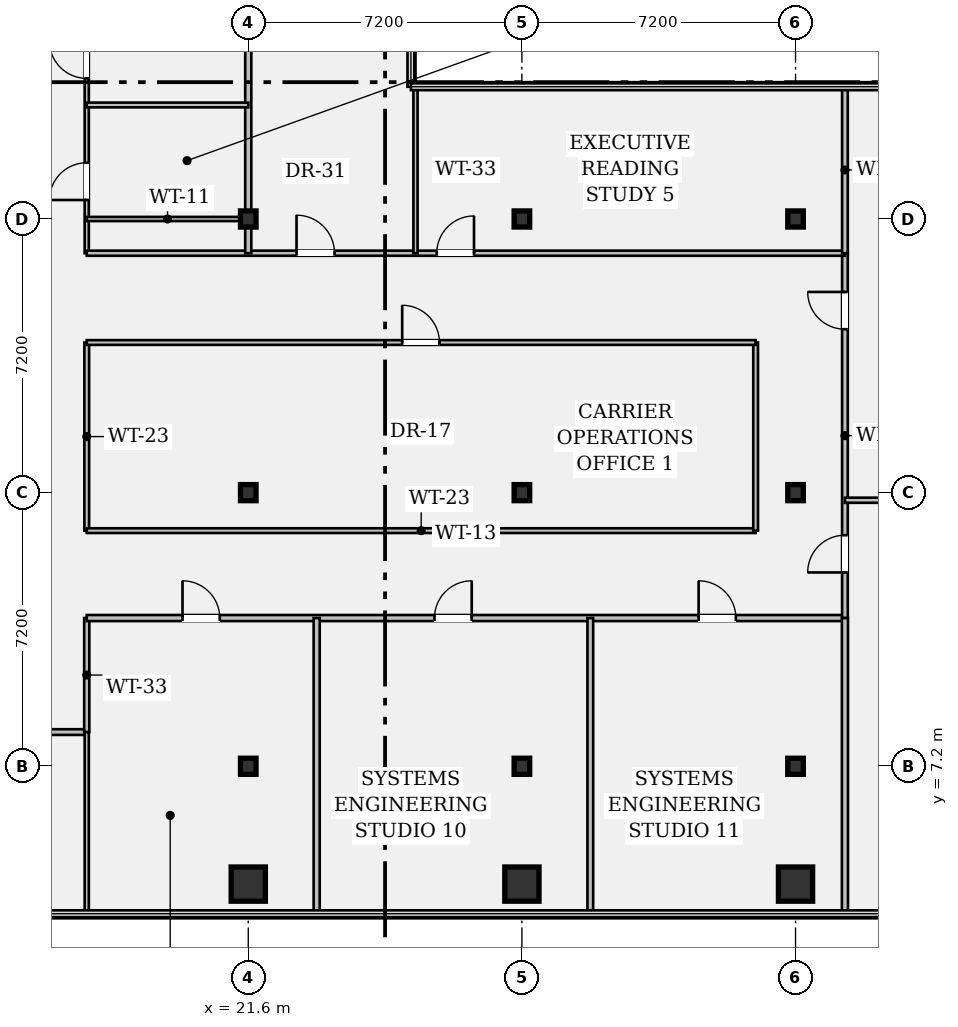
"""IFC4 building model, lengths in metres.
Left out: names, types, materials, properties, quantities, classifications, styles, units other than length and angle.
Written with IfcOpenShell. Run it as: python <this file> out.ifc"""

import sys

from ifc_helpers import new_model, si_unit, direction, frame, frame_2d, origin, origin_2d, place, context, subcontext, project, spatial, rectangle, hollow_rectangle, i_section, extrude, element, fill, save


model = new_model("IFC4")
c1 = context("Model", 3, precision=1e-05, world=origin(), true_north=direction((0.0, 1.0)))
c2 = subcontext(c1, "Body", "Model", "MODEL_VIEW")
j1 = project(units=[si_unit("LENGTHUNIT", "METRE"), si_unit("PLANEANGLEUNIT", "RADIAN")], contexts=[c1])
p1 = place(None, origin())
s1 = spatial("IfcSite", under=j1, at=p1, CompositionType="ELEMENT")
p2 = place(p1, origin())
s2 = spatial("IfcBuilding", under=s1, at=p2, CompositionType="ELEMENT")
p3 = place(p2, frame((0.0, 0.0, 129.15)))
s3 = spatial("IfcBuildingStorey", under=s2, at=p3, CompositionType="ELEMENT", Elevation=129.15)
p4 = place(p3, frame((21.6, 4.1, 0.0), z_axis=(0.0, 0.0, 1.0), x_axis=(1.0, 0.0, 0.0)))
e1 = element("IfcColumn", 1, at=p4, inside=s3, PredefinedType="COLUMN", context=c2, shape_type="SweptSolid", body=[
    extrude(hollow_rectangle(XDim=0.9, YDim=0.9, WallThickness=0.055, at=origin_2d()), origin(), (0.0, 0.0, 1.0), 3.58),
])
for number, where, z_axis, x_axis in (
    (2, (21.6, 7.2, 0.0), (0.0, 0.0, 1.0), (1.0, 0.0, 0.0)),
    (3, (21.6, 14.4, 0.0), (0.0, 0.0, 1.0), (1.0, 0.0, 0.0)),
    (4, (21.6, 21.6, 0.0), (0.0, 0.0, 1.0), (1.0, 0.0, 0.0)),
):
    element("IfcColumn", number, at=place(p3, frame(where, z_axis=z_axis, x_axis=x_axis)), inside=s3, PredefinedType="COLUMN", context=c2, shape_type="SweptSolid", body=[
        extrude(i_section(OverallWidth=0.409, OverallDepth=0.424, WebThickness=0.033, FlangeThickness=0.052, FilletRadius=0.018, at=origin_2d()), origin(), (0.0, 0.0, 1.0), 3.58),
    ])
p5 = place(p3, frame((28.8, 4.1, 0.0), z_axis=(0.0, 0.0, 1.0), x_axis=(1.0, 0.0, 0.0)))
e5 = element("IfcColumn", 5, at=p5, inside=s3, PredefinedType="COLUMN", context=c2, shape_type="SweptSolid", body=[
    extrude(hollow_rectangle(XDim=0.9, YDim=0.9, WallThickness=0.055, at=origin_2d()), origin(), (0.0, 0.0, 1.0), 3.58),
])
for number, where, z_axis, x_axis in (
    (6, (28.8, 7.2, 0.0), (0.0, 0.0, 1.0), (1.0, 0.0, 0.0)),
    (7, (28.8, 14.4, 0.0), (0.0, 0.0, 1.0), (1.0, 0.0, 0.0)),
    (8, (28.8, 21.6, 0.0), (0.0, 0.0, 1.0), (1.0, 0.0, 0.0)),
):
    element("IfcColumn", number, at=place(p3, frame(where, z_axis=z_axis, x_axis=x_axis)), inside=s3, PredefinedType="COLUMN", context=c2, shape_type="SweptSolid", body=[
        extrude(i_section(OverallWidth=0.409, OverallDepth=0.424, WebThickness=0.033, FlangeThickness=0.052, FilletRadius=0.018, at=origin_2d()), origin(), (0.0, 0.0, 1.0), 3.58),
    ])
p6 = place(p3, frame((36.0, 4.1, 0.0), z_axis=(0.0, 0.0, 1.0), x_axis=(1.0, 0.0, 0.0)))
e9 = element("IfcColumn", 9, at=p6, inside=s3, PredefinedType="COLUMN", context=c2, shape_type="SweptSolid", body=[
    extrude(hollow_rectangle(XDim=0.9, YDim=0.9, WallThickness=0.055, at=origin_2d()), origin(), (0.0, 0.0, 1.0), 3.58),
])
for number, where, z_axis, x_axis in (
    (10, (36.0, 7.2, 0.0), (0.0, 0.0, 1.0), (1.0, 0.0, 0.0)),
    (11, (36.0, 14.4, 0.0), (0.0, 0.0, 1.0), (1.0, 0.0, 0.0)),
    (12, (36.0, 21.6, 0.0), (0.0, 0.0, 1.0), (1.0, 0.0, 0.0)),
):
    element("IfcColumn", number, at=place(p3, frame(where, z_axis=z_axis, x_axis=x_axis)), inside=s3, PredefinedType="COLUMN", context=c2, shape_type="SweptSolid", body=[
        extrude(i_section(OverallWidth=0.409, OverallDepth=0.424, WebThickness=0.033, FlangeThickness=0.052, FilletRadius=0.018, at=origin_2d()), origin(), (0.0, 0.0, 1.0), 3.58),
    ])
p7 = place(p3, frame((14.4, 8.1, 0.0), z_axis=(0.0, 0.0, 1.0), x_axis=(1.0, 0.0, 0.0)))
e13 = element("IfcWall", 13, at=p7, inside=s3, PredefinedType="PARTITIONING", context=c2, shape_type="SweptSolid", body=[
    extrude(rectangle(XDim=2.95, YDim=0.15, at=frame_2d((1.475, 0.0))), origin(), (0.0, 0.0, 1.0), 3.148),
])
p8 = place(p7, frame((0.95, 0.0, 0.0)))
e14 = element("IfcOpeningElement", 14, at=p8, cuts=e13, PredefinedType="OPENING", context=c2, shape_type="SweptSolid", body=[
    extrude(rectangle(XDim=0.98, YDim=2.15, at=frame_2d((0.49, 1.075))), frame((0.0, 0.087, 0.0), z_axis=(0.0, -1.0, 0.0), x_axis=(1.0, 0.0, 0.0)), (0.0, 0.0, 1.0), 0.174),
])
p9 = place(p3, frame((17.35, 8.1, 0.0), z_axis=(0.0, 0.0, 1.0), x_axis=(0.0, 1.0, 0.0)))
e15 = element("IfcWall", 15, at=p9, inside=s3, PredefinedType="PARTITIONING", context=c2, shape_type="SweptSolid", body=[
    extrude(rectangle(XDim=3.0, YDim=0.135, at=frame_2d((1.5, 0.0))), origin(), (0.0, 0.0, 1.0), 3.58),
])
p10 = place(p3, frame((17.35, 20.7, 0.0), z_axis=(0.0, 0.0, 1.0), x_axis=(0.0, 1.0, 0.0)))
e16 = element("IfcWall", 16, at=p10, inside=s3, PredefinedType="PARTITIONING", context=c2, shape_type="SweptSolid", body=[
    extrude(rectangle(XDim=15.2, YDim=0.11, at=frame_2d((7.6, 0.0))), origin(), (0.0, 0.0, 1.0), 2.869),
])
p11 = place(p10, frame((1.4, 0.0, 0.0)))
e17 = element("IfcOpeningElement", 17, at=p11, cuts=e16, PredefinedType="OPENING", context=c2, shape_type="SweptSolid", body=[
    extrude(rectangle(XDim=0.98, YDim=2.15, at=frame_2d((0.49, 1.075))), frame((0.0, 0.067, 0.0), z_axis=(0.0, -1.0, 0.0), x_axis=(1.0, 0.0, 0.0)), (0.0, 0.0, 1.0), 0.134),
])
p12 = place(p10, frame((4.6, 0.0, 0.0)))
e18 = element("IfcOpeningElement", 18, at=p12, cuts=e16, PredefinedType="OPENING", context=c2, shape_type="SweptSolid", body=[
    extrude(rectangle(XDim=0.98, YDim=2.15, at=frame_2d((0.49, 1.075))), frame((0.0, 0.067, 0.0), z_axis=(0.0, -1.0, 0.0), x_axis=(1.0, 0.0, 0.0)), (0.0, 0.0, 1.0), 0.134),
])
p13 = place(p10, frame((8.0, 0.0, 0.0)))
e19 = element("IfcOpeningElement", 19, at=p13, cuts=e16, PredefinedType="OPENING", context=c2, shape_type="SweptSolid", body=[
    extrude(rectangle(XDim=0.98, YDim=2.15, at=frame_2d((0.49, 1.075))), frame((0.0, 0.067, 0.0), z_axis=(0.0, -1.0, 0.0), x_axis=(1.0, 0.0, 0.0)), (0.0, 0.0, 1.0), 0.134),
])
p14 = place(p10, frame((11.5, 0.0, 0.0)))
e20 = element("IfcOpeningElement", 20, at=p14, cuts=e16, PredefinedType="OPENING", context=c2, shape_type="SweptSolid", body=[
    extrude(rectangle(XDim=0.98, YDim=2.15, at=frame_2d((0.49, 1.075))), frame((0.0, 0.067, 0.0), z_axis=(0.0, -1.0, 0.0), x_axis=(1.0, 0.0, 0.0)), (0.0, 0.0, 1.0), 0.134),
])
p15 = place(p3, frame((17.35, 11.1, 0.0), z_axis=(0.0, 0.0, 1.0), x_axis=(1.0, 0.0, 0.0)))
e21 = element("IfcWall", 21, at=p15, inside=s3, PredefinedType="PARTITIONING", context=c2, shape_type="SweptSolid", body=[
    extrude(rectangle(XDim=19.95, YDim=0.16, at=frame_2d((9.975, 0.0))), origin(), (0.0, 0.0, 1.0), 2.869),
])
p16 = place(p15, frame((2.52, 0.0, 0.0)))
e22 = element("IfcOpeningElement", 22, at=p16, cuts=e21, PredefinedType="OPENING", context=c2, shape_type="SweptSolid", body=[
    extrude(rectangle(XDim=0.98, YDim=2.15, at=frame_2d((0.49, 1.075))), frame((0.0, 0.092, 0.0), z_axis=(0.0, -1.0, 0.0), x_axis=(1.0, 0.0, 0.0)), (0.0, 0.0, 1.0), 0.184),
])
p17 = place(p15, frame((9.15, 0.0, 0.0)))
e23 = element("IfcOpeningElement", 23, at=p17, cuts=e21, PredefinedType="OPENING", context=c2, shape_type="SweptSolid", body=[
    extrude(rectangle(XDim=0.98, YDim=2.15, at=frame_2d((0.49, 1.075))), frame((0.0, 0.092, 0.0), z_axis=(0.0, -1.0, 0.0), x_axis=(1.0, 0.0, 0.0)), (0.0, 0.0, 1.0), 0.184),
])
p18 = place(p15, frame((16.1, 0.0, 0.0)))
e24 = element("IfcOpeningElement", 24, at=p18, cuts=e21, PredefinedType="OPENING", context=c2, shape_type="SweptSolid", body=[
    extrude(rectangle(XDim=0.98, YDim=2.15, at=frame_2d((0.49, 1.075))), frame((0.0, 0.092, 0.0), z_axis=(0.0, -1.0, 0.0), x_axis=(1.0, 0.0, 0.0)), (0.0, 0.0, 1.0), 0.184),
])
p19 = place(p3, frame((37.3, 11.1, 0.0), z_axis=(0.0, 0.0, 1.0), x_axis=(0.0, 1.0, 0.0)))
e25 = element("IfcWall", 25, at=p19, inside=s3, PredefinedType="PARTITIONING", context=c2, shape_type="SweptSolid", body=[
    extrude(rectangle(XDim=9.6, YDim=0.15, at=frame_2d((4.8, 0.0))), origin(), (0.0, 0.0, 1.0), 2.869),
])
p20 = place(p19, frame((1.2, 0.0, 0.0)))
e26 = element("IfcOpeningElement", 26, at=p20, cuts=e25, PredefinedType="OPENING", context=c2, shape_type="SweptSolid", body=[
    extrude(rectangle(XDim=0.98, YDim=2.15, at=frame_2d((0.49, 1.075))), frame((0.0, 0.087, 0.0), z_axis=(0.0, -1.0, 0.0), x_axis=(1.0, 0.0, 0.0)), (0.0, 0.0, 1.0), 0.174),
])
p21 = place(p19, frame((7.6, 0.0, 0.0)))
e27 = element("IfcOpeningElement", 27, at=p21, cuts=e25, PredefinedType="OPENING", context=c2, shape_type="SweptSolid", body=[
    extrude(rectangle(XDim=0.98, YDim=2.15, at=frame_2d((0.49, 1.075))), frame((0.0, 0.087, 0.0), z_axis=(0.0, -1.0, 0.0), x_axis=(1.0, 0.0, 0.0)), (0.0, 0.0, 1.0), 0.174),
])
p22 = place(p3, frame((17.35, 20.7, 0.0), z_axis=(0.0, 0.0, 1.0), x_axis=(1.0, 0.0, 0.0)))
e28 = element("IfcWall", 28, at=p22, inside=s3, PredefinedType="PARTITIONING", context=c2, shape_type="SweptSolid", body=[
    extrude(rectangle(XDim=19.95, YDim=0.135, at=frame_2d((9.975, 0.0))), origin(), (0.0, 0.0, 1.0), 2.869),
])
p23 = place(p22, frame((5.52, 0.0, 0.0)))
e29 = element("IfcOpeningElement", 29, at=p23, cuts=e28, PredefinedType="OPENING", context=c2, shape_type="SweptSolid", body=[
    extrude(rectangle(XDim=1.0, YDim=2.15, at=frame_2d((0.5, 1.075))), frame((0.0, 0.08, 0.0), z_axis=(0.0, -1.0, 0.0), x_axis=(1.0, 0.0, 0.0)), (0.0, 0.0, 1.0), 0.159),
])
p24 = place(p22, frame((9.21, 0.0, 0.0)))
e30 = element("IfcOpeningElement", 30, at=p24, cuts=e28, PredefinedType="OPENING", context=c2, shape_type="SweptSolid", body=[
    extrude(rectangle(XDim=0.98, YDim=2.15, at=frame_2d((0.49, 1.075))), frame((0.0, 0.08, 0.0), z_axis=(0.0, -1.0, 0.0), x_axis=(1.0, 0.0, 0.0)), (0.0, 0.0, 1.0), 0.159),
])
p25 = place(p3, frame((17.35, 13.4, 0.0), z_axis=(0.0, 0.0, 1.0), x_axis=(0.0, 1.0, 0.0)))
e31 = element("IfcWall", 31, at=p25, inside=s3, PredefinedType="PARTITIONING", context=c2, shape_type="SweptSolid", body=[
    extrude(rectangle(XDim=4.95, YDim=0.125, at=frame_2d((2.475, 0.0))), origin(), (0.0, 0.0, 1.0), 2.869),
])
p26 = place(p3, frame((17.35, 13.4, 0.0), z_axis=(0.0, 0.0, 1.0), x_axis=(1.0, 0.0, 0.0)))
e32 = element("IfcWall", 32, at=p26, inside=s3, PredefinedType="PARTITIONING", context=c2, shape_type="SweptSolid", body=[
    extrude(rectangle(XDim=17.6, YDim=0.125, at=frame_2d((8.8, 0.0))), origin(), (0.0, 0.0, 1.0), 2.869),
])
p27 = place(p3, frame((34.95, 13.4, 0.0), z_axis=(0.0, 0.0, 1.0), x_axis=(0.0, 1.0, 0.0)))
e33 = element("IfcWall", 33, at=p27, inside=s3, PredefinedType="PARTITIONING", context=c2, shape_type="SweptSolid", body=[
    extrude(rectangle(XDim=4.95, YDim=0.125, at=frame_2d((2.475, 0.0))), origin(), (0.0, 0.0, 1.0), 2.869),
])
p28 = place(p3, frame((17.35, 18.35, 0.0), z_axis=(0.0, 0.0, 1.0), x_axis=(1.0, 0.0, 0.0)))
e34 = element("IfcWall", 34, at=p28, inside=s3, PredefinedType="PARTITIONING", context=c2, shape_type="SweptSolid", body=[
    extrude(rectangle(XDim=17.6, YDim=0.125, at=frame_2d((8.8, 0.0))), origin(), (0.0, 0.0, 1.0), 2.869),
])
p29 = place(p28, frame((8.3, 0.0, 0.0)))
e35 = element("IfcOpeningElement", 35, at=p29, cuts=e34, PredefinedType="OPENING", context=c2, shape_type="SweptSolid", body=[
    extrude(rectangle(XDim=0.98, YDim=2.15, at=frame_2d((0.49, 1.075))), frame((0.0, 0.074, 0.0), z_axis=(0.0, -1.0, 0.0), x_axis=(1.0, 0.0, 0.0)), (0.0, 0.0, 1.0), 0.149),
])
p30 = place(p3, frame((17.35, 21.6, 0.0), z_axis=(0.0, 0.0, 1.0), x_axis=(1.0, 0.0, 0.0)))
e36 = element("IfcWall", 36, at=p30, inside=s3, PredefinedType="PARTITIONING", context=c2, shape_type="SweptSolid", body=[
    extrude(rectangle(XDim=4.25, YDim=0.11, at=frame_2d((2.125, 0.0))), origin(), (0.0, 0.0, 1.0), 2.869),
])
p31 = place(p3, frame((21.6, 20.7, 0.0), z_axis=(0.0, 0.0, 1.0), x_axis=(0.0, 1.0, 0.0)))
e37 = element("IfcWall", 37, at=p31, inside=s3, PredefinedType="PARTITIONING", context=c2, shape_type="SweptSolid", body=[
    extrude(rectangle(XDim=22.38, YDim=0.16, at=frame_2d((11.19, 0.0))), origin(), (0.0, 0.0, 1.0), 2.869),
])
p32 = place(p3, frame((17.35, 24.6, 0.0), z_axis=(0.0, 0.0, 1.0), x_axis=(1.0, 0.0, 0.0)))
e38 = element("IfcWall", 38, at=p32, inside=s3, PredefinedType="PARTITIONING", context=c2, shape_type="SweptSolid", body=[
    extrude(rectangle(XDim=4.25, YDim=0.125, at=frame_2d((2.125, 0.0))), origin(), (0.0, 0.0, 1.0), 2.869),
])
p33 = place(p3, frame((26.0, 20.7, 0.0), z_axis=(0.0, 0.0, 1.0), x_axis=(0.0, 1.0, 0.0)))
e39 = element("IfcWall", 39, at=p33, inside=s3, PredefinedType="PARTITIONING", context=c2, shape_type="SweptSolid", body=[
    extrude(rectangle(XDim=4.38, YDim=0.11, at=frame_2d((2.19, 0.0))), origin(), (0.0, 0.0, 1.0), 2.869),
])
p34 = place(p3, frame((37.3, 3.32, 0.0), z_axis=(0.0, 0.0, 1.0), x_axis=(0.0, 1.0, 0.0)))
e40 = element("IfcWall", 40, at=p34, inside=s3, PredefinedType="PARTITIONING", context=c2, shape_type="SweptSolid", body=[
    extrude(rectangle(XDim=7.78, YDim=0.16, at=frame_2d((3.89, 0.0))), origin(), (0.0, 0.0, 1.0), 2.869),
])
p35 = place(p3, frame((37.3, 20.7, 0.0), z_axis=(0.0, 0.0, 1.0), x_axis=(0.0, 1.0, 0.0)))
e41 = element("IfcWall", 41, at=p35, inside=s3, PredefinedType="PARTITIONING", context=c2, shape_type="SweptSolid", body=[
    extrude(rectangle(XDim=4.38, YDim=0.15, at=frame_2d((2.19, 0.0))), origin(), (0.0, 0.0, 1.0), 2.869),
])
p36 = place(p3, frame((37.3, 14.2, 0.0), z_axis=(0.0, 0.0, 1.0), x_axis=(1.0, 0.0, 0.0)))
e42 = element("IfcWall", 42, at=p36, inside=s3, PredefinedType="PARTITIONING", context=c2, shape_type="SweptSolid", body=[
    extrude(rectangle(XDim=9.78, YDim=0.135, at=frame_2d((4.89, 0.0))), origin(), (0.0, 0.0, 1.0), 2.869),
])
p37 = place(p3, frame((17.35, 3.32, 0.0), z_axis=(0.0, 0.0, 1.0), x_axis=(0.0, 1.0, 0.0)))
e43 = element("IfcWall", 43, at=p37, inside=s3, PredefinedType="PARTITIONING", context=c2, shape_type="SweptSolid", body=[
    extrude(rectangle(XDim=4.78, YDim=0.11, at=frame_2d((2.39, 0.0))), origin(), (0.0, 0.0, 1.0), 2.869),
])
p38 = place(p3, frame((23.4, 3.32, 0.0), z_axis=(0.0, 0.0, 1.0), x_axis=(0.0, 1.0, 0.0)))
e44 = element("IfcWall", 44, at=p38, inside=s3, PredefinedType="PARTITIONING", context=c2, shape_type="SweptSolid", body=[
    extrude(rectangle(XDim=7.78, YDim=0.16, at=frame_2d((3.89, 0.0))), origin(), (0.0, 0.0, 1.0), 2.869),
])
p39 = place(p3, frame((30.6, 3.32, 0.0), z_axis=(0.0, 0.0, 1.0), x_axis=(0.0, 1.0, 0.0)))
e45 = element("IfcWall", 45, at=p39, inside=s3, PredefinedType="PARTITIONING", context=c2, shape_type="SweptSolid", body=[
    extrude(rectangle(XDim=7.78, YDim=0.15, at=frame_2d((3.89, 0.0))), origin(), (0.0, 0.0, 1.0), 2.869),
])
p40 = place(p29, origin())
e46 = element("IfcDoor", 46, at=p40, inside=s3, OperationType="SINGLE_SWING_LEFT", PredefinedType="DOOR", context=c2, shape_type="SweptSolid", body=[
    extrude(rectangle(XDim=0.98, YDim=2.15, at=frame_2d((0.49, 1.075))), frame((0.0, 0.025, 0.0), z_axis=(0.0, -1.0, 0.0), x_axis=(1.0, 0.0, 0.0)), (0.0, 0.0, 1.0), 0.05),
])
fill(e35, e46)
p41 = place(p11, origin())
e47 = element("IfcDoor", 47, at=p41, inside=s3, OperationType="SINGLE_SWING_LEFT", PredefinedType="DOOR", context=c2, shape_type="SweptSolid", body=[
    extrude(rectangle(XDim=0.98, YDim=2.15, at=frame_2d((0.49, 1.075))), frame((0.0, 0.025, 0.0), z_axis=(0.0, -1.0, 0.0), x_axis=(1.0, 0.0, 0.0)), (0.0, 0.0, 1.0), 0.05),
])
fill(e17, e47)
p42 = place(p12, origin())
e48 = element("IfcDoor", 48, at=p42, inside=s3, OperationType="SINGLE_SWING_RIGHT", PredefinedType="DOOR", context=c2, shape_type="SweptSolid", body=[
    extrude(rectangle(XDim=0.98, YDim=2.15, at=frame_2d((0.49, 1.075))), frame((0.0, 0.025, 0.0), z_axis=(0.0, -1.0, 0.0), x_axis=(1.0, 0.0, 0.0)), (0.0, 0.0, 1.0), 0.05),
])
fill(e18, e48)
p43 = place(p23, origin())
e49 = element("IfcDoor", 49, at=p43, inside=s3, OperationType="SINGLE_SWING_LEFT", PredefinedType="DOOR", context=c2, shape_type="SweptSolid", body=[
    extrude(rectangle(XDim=1.0, YDim=2.15, at=frame_2d((0.5, 1.075))), frame((0.0, 0.025, 0.0), z_axis=(0.0, -1.0, 0.0), x_axis=(1.0, 0.0, 0.0)), (0.0, 0.0, 1.0), 0.05),
])
fill(e29, e49)
p44 = place(p24, origin())
e50 = element("IfcDoor", 50, at=p44, inside=s3, OperationType="SINGLE_SWING_RIGHT", PredefinedType="DOOR", context=c2, shape_type="SweptSolid", body=[
    extrude(rectangle(XDim=0.98, YDim=2.15, at=frame_2d((0.49, 1.075))), frame((0.0, 0.025, 0.0), z_axis=(0.0, -1.0, 0.0), x_axis=(1.0, 0.0, 0.0)), (0.0, 0.0, 1.0), 0.05),
])
fill(e30, e50)
p45 = place(p20, origin())
e51 = element("IfcDoor", 51, at=p45, inside=s3, OperationType="SINGLE_SWING_LEFT", PredefinedType="DOOR", context=c2, shape_type="SweptSolid", body=[
    extrude(rectangle(XDim=0.98, YDim=2.15, at=frame_2d((0.49, 1.075))), frame((0.0, 0.025, 0.0), z_axis=(0.0, -1.0, 0.0), x_axis=(1.0, 0.0, 0.0)), (0.0, 0.0, 1.0), 0.05),
])
fill(e26, e51)
p46 = place(p21, origin())
e52 = element("IfcDoor", 52, at=p46, inside=s3, OperationType="SINGLE_SWING_RIGHT", PredefinedType="DOOR", context=c2, shape_type="SweptSolid", body=[
    extrude(rectangle(XDim=0.98, YDim=2.15, at=frame_2d((0.49, 1.075))), frame((0.0, 0.025, 0.0), z_axis=(0.0, -1.0, 0.0), x_axis=(1.0, 0.0, 0.0)), (0.0, 0.0, 1.0), 0.05),
])
fill(e27, e52)
p47 = place(p16, origin())
e53 = element("IfcDoor", 53, at=p47, inside=s3, OperationType="SINGLE_SWING_LEFT", PredefinedType="DOOR", context=c2, shape_type="SweptSolid", body=[
    extrude(rectangle(XDim=0.98, YDim=2.15, at=frame_2d((0.49, 1.075))), frame((0.0, 0.025, 0.0), z_axis=(0.0, -1.0, 0.0), x_axis=(1.0, 0.0, 0.0)), (0.0, 0.0, 1.0), 0.05),
])
fill(e22, e53)
p48 = place(p17, origin())
e54 = element("IfcDoor", 54, at=p48, inside=s3, OperationType="SINGLE_SWING_RIGHT", PredefinedType="DOOR", context=c2, shape_type="SweptSolid", body=[
    extrude(rectangle(XDim=0.98, YDim=2.15, at=frame_2d((0.49, 1.075))), frame((0.0, 0.025, 0.0), z_axis=(0.0, -1.0, 0.0), x_axis=(1.0, 0.0, 0.0)), (0.0, 0.0, 1.0), 0.05),
])
fill(e23, e54)
p49 = place(p18, origin())
e55 = element("IfcDoor", 55, at=p49, inside=s3, OperationType="SINGLE_SWING_LEFT", PredefinedType="DOOR", context=c2, shape_type="SweptSolid", body=[
    extrude(rectangle(XDim=0.98, YDim=2.15, at=frame_2d((0.49, 1.075))), frame((0.0, 0.025, 0.0), z_axis=(0.0, -1.0, 0.0), x_axis=(1.0, 0.0, 0.0)), (0.0, 0.0, 1.0), 0.05),
])
fill(e24, e55)
save(model, sys.argv[1])
